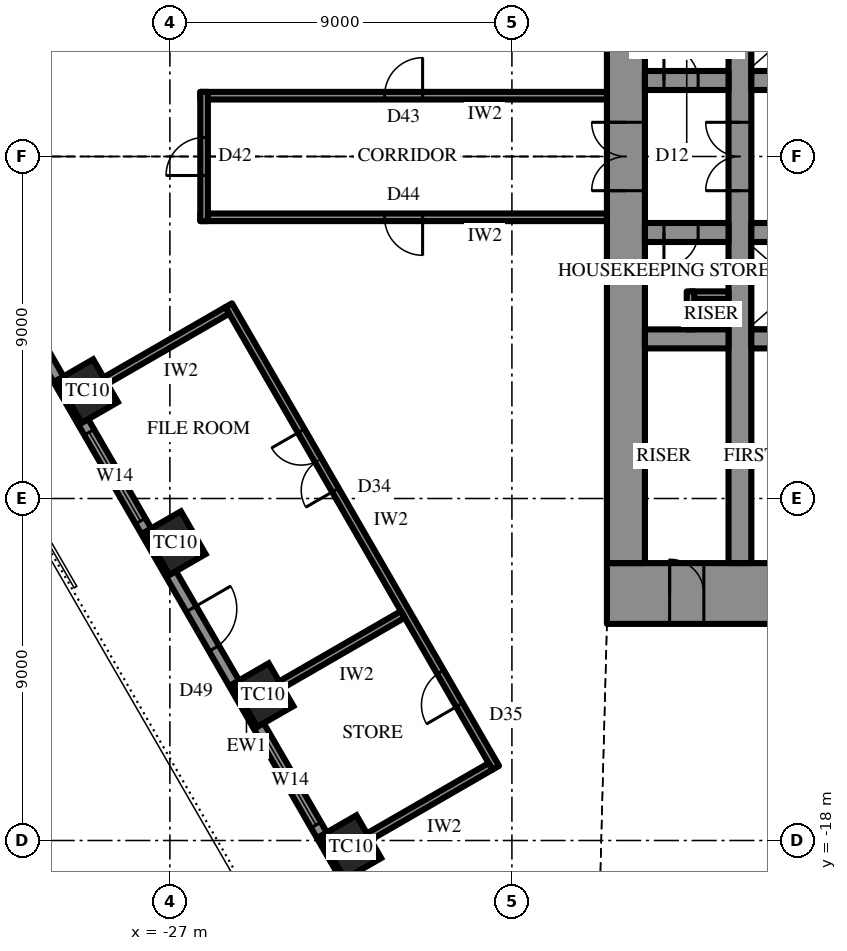
"""IFC4 building model, lengths in metres.
Left out: names, types, materials, properties, quantities, classifications, styles, units other than length and angle.
Written with IfcOpenShell. Run it as: python <this file> out.ifc"""

import sys

from ifc_helpers import new_model, si_unit, direction, frame, frame_2d, origin, origin_2d, place, context, subcontext, project, spatial, rectangle, extrude, element, fill, save


model = new_model("IFC4")
c1 = context("Model", 3, precision=1e-05, world=origin(), true_north=direction((0.0, 1.0)))
c2 = subcontext(c1, "Body", "Model", "MODEL_VIEW")
j1 = project(units=[si_unit("LENGTHUNIT", "METRE"), si_unit("PLANEANGLEUNIT", "RADIAN")], contexts=[c1])
p1 = place(None, origin())
s1 = spatial("IfcSite", under=j1, at=p1, CompositionType="ELEMENT")
p2 = place(p1, origin())
s2 = spatial("IfcBuilding", under=s1, at=p2, CompositionType="ELEMENT")
p3 = place(p2, frame((0.0, 0.0, 253.3)))
s3 = spatial("IfcBuildingStorey", under=s2, at=p3, CompositionType="ELEMENT", Elevation=253.3)
for number, where, z_axis, x_axis in (
    (1, (-29.171, -6.175, 0.0), (0.0, 0.0, 1.0), (0.5, -0.866, 0.0)),
    (2, (-26.861, -10.175, 0.0), (0.0, 0.0, 1.0), (0.5, -0.866, 0.0)),
    (3, (-24.552, -14.175, 0.0), (0.0, 0.0, 1.0), (0.5, -0.866, 0.0)),
    (4, (-22.242, -18.175, 0.0), (0.0, 0.0, 1.0), (0.5, -0.866, 0.0)),
):
    element("IfcColumn", number, at=place(p3, frame(where, z_axis=z_axis, x_axis=x_axis)), inside=s3, PredefinedType="COLUMN", context=c2, shape_type="SweptSolid", body=[
        extrude(rectangle(XDim=1.3, YDim=1.1, at=origin_2d()), origin(), (0.0, 0.0, 1.0), 4.2),
    ])
p4 = place(p3, frame((15.5, -11.5, 0.0), z_axis=(0.0, 0.0, 1.0), x_axis=(-1.0, 0.0, 0.0)))
e5 = element("IfcWall", 5, at=p4, inside=s3, PredefinedType="SHEAR", context=c2, shape_type="SweptSolid", body=[
    extrude(rectangle(XDim=31.0, YDim=1.6, at=frame_2d((15.5, 0.0))), origin(), (0.0, 0.0, 1.0), 4.2),
])
p5 = place(p4, frame((16.35, 0.0, 0.0)))
e6 = element("IfcOpeningElement", 6, at=p5, cuts=e5, PredefinedType="OPENING", context=c2, shape_type="SweptSolid", body=[
    extrude(rectangle(XDim=0.9, YDim=2.2, at=frame_2d((0.45, 1.1))), frame((0.0, 0.81, 0.0), z_axis=(0.0, -1.0, 0.0), x_axis=(1.0, 0.0, 0.0)), (0.0, 0.0, 1.0), 1.62),
])
p6 = place(p4, frame((19.35, 0.0, 0.0)))
e7 = element("IfcOpeningElement", 7, at=p6, cuts=e5, PredefinedType="OPENING", context=c2, shape_type="SweptSolid", body=[
    extrude(rectangle(XDim=0.9, YDim=2.2, at=frame_2d((0.45, 1.1))), frame((0.0, 0.81, 0.0), z_axis=(0.0, -1.0, 0.0), x_axis=(1.0, 0.0, 0.0)), (0.0, 0.0, 1.0), 1.62),
])
p7 = place(p4, frame((22.4, 0.0, 0.0)))
e8 = element("IfcOpeningElement", 8, at=p7, cuts=e5, PredefinedType="OPENING", context=c2, shape_type="SweptSolid", body=[
    extrude(rectangle(XDim=1.0, YDim=2.2, at=frame_2d((0.5, 1.1))), frame((0.0, 0.81, 0.0), z_axis=(0.0, -1.0, 0.0), x_axis=(1.0, 0.0, 0.0)), (0.0, 0.0, 1.0), 1.62),
])
p8 = place(p4, frame((1.65, 0.0, 0.0)))
e9 = element("IfcOpeningElement", 9, at=p8, cuts=e5, PredefinedType="OPENING", context=c2, shape_type="SweptSolid", body=[
    extrude(rectangle(XDim=0.9, YDim=2.2, at=frame_2d((0.45, 1.1))), frame((0.0, 0.81, 0.0), z_axis=(0.0, -1.0, 0.0), x_axis=(1.0, 0.0, 0.0)), (0.0, 0.0, 1.0), 1.62),
])
p9 = place(p4, frame((4.65, 0.0, 0.0)))
e10 = element("IfcOpeningElement", 10, at=p9, cuts=e5, PredefinedType="OPENING", context=c2, shape_type="SweptSolid", body=[
    extrude(rectangle(XDim=0.9, YDim=2.2, at=frame_2d((0.45, 1.1))), frame((0.0, 0.81, 0.0), z_axis=(0.0, -1.0, 0.0), x_axis=(1.0, 0.0, 0.0)), (0.0, 0.0, 1.0), 1.62),
])
p10 = place(p4, frame((25.45, 0.0, 0.0)))
e11 = element("IfcOpeningElement", 11, at=p10, cuts=e5, PredefinedType="OPENING", context=c2, shape_type="SweptSolid", body=[
    extrude(rectangle(XDim=0.9, YDim=2.2, at=frame_2d((0.45, 1.1))), frame((0.0, 0.81, 0.0), z_axis=(0.0, -1.0, 0.0), x_axis=(1.0, 0.0, 0.0)), (0.0, 0.0, 1.0), 1.62),
])
p11 = place(p4, frame((28.45, 0.0, 0.0)))
e12 = element("IfcOpeningElement", 12, at=p11, cuts=e5, PredefinedType="OPENING", context=c2, shape_type="SweptSolid", body=[
    extrude(rectangle(XDim=0.9, YDim=2.2, at=frame_2d((0.45, 1.1))), frame((0.0, 0.81, 0.0), z_axis=(0.0, -1.0, 0.0), x_axis=(1.0, 0.0, 0.0)), (0.0, 0.0, 1.0), 1.62),
])
p12 = place(p3, frame((-15.0, 10.7, 0.0), z_axis=(0.0, 0.0, 1.0), x_axis=(0.0, -1.0, 0.0)))
e13 = element("IfcWall", 13, at=p12, inside=s3, PredefinedType="SHEAR", context=c2, shape_type="SweptSolid", body=[
    extrude(rectangle(XDim=21.4, YDim=1.0, at=frame_2d((10.7, 0.0))), origin(), (0.0, 0.0, 1.0), 4.2),
])
p13 = place(p12, frame((9.8, 0.0, 0.0)))
e14 = element("IfcOpeningElement", 14, at=p13, cuts=e13, PredefinedType="OPENING", context=c2, shape_type="SweptSolid", body=[
    extrude(rectangle(XDim=1.8, YDim=2.4, at=frame_2d((0.9, 1.2))), frame((0.0, 0.51, 0.0), z_axis=(0.0, -1.0, 0.0), x_axis=(1.0, 0.0, 0.0)), (0.0, 0.0, 1.0), 1.02),
])
p14 = place(p3, frame((-12.0, -10.7, 0.0), z_axis=(0.0, 0.0, 1.0), x_axis=(0.0, 1.0, 0.0)))
e15 = element("IfcWall", 15, at=p14, inside=s3, PredefinedType="SHEAR", context=c2, shape_type="SweptSolid", body=[
    extrude(rectangle(XDim=21.4, YDim=0.6, at=frame_2d((10.7, 0.0))), origin(), (0.0, 0.0, 1.0), 4.2),
])
p15 = place(p14, frame((9.8, 0.0, 0.0)))
e16 = element("IfcOpeningElement", 16, at=p15, cuts=e15, PredefinedType="OPENING", context=c2, shape_type="SweptSolid", body=[
    extrude(rectangle(XDim=1.8, YDim=2.4, at=frame_2d((0.9, 1.2))), frame((0.0, 0.31, 0.0), z_axis=(0.0, -1.0, 0.0), x_axis=(1.0, 0.0, 0.0)), (0.0, 0.0, 1.0), 0.62),
])
p16 = place(p3, frame((-14.5, 2.0, 0.0), z_axis=(0.0, 0.0, 1.0), x_axis=(1.0, 0.0, 0.0)))
e17 = element("IfcWall", 17, at=p16, inside=s3, PredefinedType="SHEAR", context=c2, shape_type="SweptSolid", body=[
    extrude(rectangle(XDim=2.2, YDim=0.5, at=frame_2d((1.1, 0.0))), origin(), (0.0, 0.0, 1.0), 4.2),
])
p17 = place(p16, frame((0.5, 0.0, 0.0)))
e18 = element("IfcOpeningElement", 18, at=p17, cuts=e17, PredefinedType="OPENING", context=c2, shape_type="SweptSolid", body=[
    extrude(rectangle(XDim=0.9, YDim=2.2, at=frame_2d((0.45, 1.1))), frame((0.0, 0.26, 0.0), z_axis=(0.0, -1.0, 0.0), x_axis=(1.0, 0.0, 0.0)), (0.0, 0.0, 1.0), 0.52),
])
p18 = place(p3, frame((-11.7, 2.0, 0.0), z_axis=(0.0, 0.0, 1.0), x_axis=(1.0, 0.0, 0.0)))
e19 = element("IfcWall", 19, at=p18, inside=s3, PredefinedType="SHEAR", context=c2, shape_type="SweptSolid", body=[
    extrude(rectangle(XDim=5.9, YDim=0.5, at=frame_2d((2.95, 0.0))), origin(), (0.0, 0.0, 1.0), 4.2),
])
p19 = place(p3, frame((3.2, -2.0, 0.0), z_axis=(0.0, 0.0, 1.0), x_axis=(-1.0, 0.0, 0.0)))
e20 = element("IfcWall", 20, at=p19, inside=s3, PredefinedType="SHEAR", context=c2, shape_type="SweptSolid", body=[
    extrude(rectangle(XDim=14.9, YDim=0.5, at=frame_2d((7.45, 0.0))), origin(), (0.0, 0.0, 1.0), 4.2),
])
p20 = place(p19, frame((1.15, 0.0, 0.0)))
e21 = element("IfcOpeningElement", 21, at=p20, cuts=e20, PredefinedType="OPENING", context=c2, shape_type="SweptSolid", body=[
    extrude(rectangle(XDim=1.1, YDim=2.2, at=frame_2d((0.55, 1.1))), frame((0.0, 0.26, 0.0), z_axis=(0.0, -1.0, 0.0), x_axis=(1.0, 0.0, 0.0)), (0.0, 0.0, 1.0), 0.52),
])
p21 = place(p19, frame((4.15, 0.0, 0.0)))
e22 = element("IfcOpeningElement", 22, at=p21, cuts=e20, PredefinedType="OPENING", context=c2, shape_type="SweptSolid", body=[
    extrude(rectangle(XDim=1.1, YDim=2.2, at=frame_2d((0.55, 1.1))), frame((0.0, 0.26, 0.0), z_axis=(0.0, -1.0, 0.0), x_axis=(1.0, 0.0, 0.0)), (0.0, 0.0, 1.0), 0.52),
])
p22 = place(p19, frame((7.15, 0.0, 0.0)))
e23 = element("IfcOpeningElement", 23, at=p22, cuts=e20, PredefinedType="OPENING", context=c2, shape_type="SweptSolid", body=[
    extrude(rectangle(XDim=1.1, YDim=2.2, at=frame_2d((0.55, 1.1))), frame((0.0, 0.26, 0.0), z_axis=(0.0, -1.0, 0.0), x_axis=(1.0, 0.0, 0.0)), (0.0, 0.0, 1.0), 0.52),
])
p23 = place(p19, frame((10.15, 0.0, 0.0)))
e24 = element("IfcOpeningElement", 24, at=p23, cuts=e20, PredefinedType="OPENING", context=c2, shape_type="SweptSolid", body=[
    extrude(rectangle(XDim=1.1, YDim=2.2, at=frame_2d((0.55, 1.1))), frame((0.0, 0.26, 0.0), z_axis=(0.0, -1.0, 0.0), x_axis=(1.0, 0.0, 0.0)), (0.0, 0.0, 1.0), 0.52),
])
p24 = place(p3, frame((-12.3, -2.0, 0.0), z_axis=(0.0, 0.0, 1.0), x_axis=(-1.0, 0.0, 0.0)))
e25 = element("IfcWall", 25, at=p24, inside=s3, PredefinedType="SHEAR", context=c2, shape_type="SweptSolid", body=[
    extrude(rectangle(XDim=2.2, YDim=0.5, at=frame_2d((1.1, 0.0))), origin(), (0.0, 0.0, 1.0), 4.2),
])
p25 = place(p24, frame((0.8, 0.0, 0.0)))
e26 = element("IfcOpeningElement", 26, at=p25, cuts=e25, PredefinedType="OPENING", context=c2, shape_type="SweptSolid", body=[
    extrude(rectangle(XDim=0.9, YDim=2.2, at=frame_2d((0.45, 1.1))), frame((0.0, 0.26, 0.0), z_axis=(0.0, -1.0, 0.0), x_axis=(1.0, 0.0, 0.0)), (0.0, 0.0, 1.0), 0.52),
])
p26 = place(p3, frame((11.7, -4.8, 0.0), z_axis=(0.0, 0.0, 1.0), x_axis=(-1.0, 0.0, 0.0)))
e27 = element("IfcWall", 27, at=p26, inside=s3, PredefinedType="SHEAR", context=c2, shape_type="SweptSolid", body=[
    extrude(rectangle(XDim=23.4, YDim=0.5, at=frame_2d((11.7, 0.0))), origin(), (0.0, 0.0, 1.0), 4.2),
])
p27 = place(p26, frame((6.6, 0.0, 0.0)))
e28 = element("IfcOpeningElement", 28, at=p27, cuts=e27, PredefinedType="OPENING", context=c2, shape_type="SweptSolid", body=[
    extrude(rectangle(XDim=1.2, YDim=2.2, at=frame_2d((0.6, 1.1))), frame((0.0, 0.26, 0.0), z_axis=(0.0, -1.0, 0.0), x_axis=(1.0, 0.0, 0.0)), (0.0, 0.0, 1.0), 0.52),
])
p28 = place(p26, frame((3.6, 0.0, 0.0)))
e29 = element("IfcOpeningElement", 29, at=p28, cuts=e27, PredefinedType="OPENING", context=c2, shape_type="SweptSolid", body=[
    extrude(rectangle(XDim=1.2, YDim=2.2, at=frame_2d((0.6, 1.1))), frame((0.0, 0.26, 0.0), z_axis=(0.0, -1.0, 0.0), x_axis=(1.0, 0.0, 0.0)), (0.0, 0.0, 1.0), 0.52),
])
p29 = place(p3, frame((-12.3, -4.8, 0.0), z_axis=(0.0, 0.0, 1.0), x_axis=(-1.0, 0.0, 0.0)))
e30 = element("IfcWall", 30, at=p29, inside=s3, PredefinedType="SHEAR", context=c2, shape_type="SweptSolid", body=[
    extrude(rectangle(XDim=2.2, YDim=0.5, at=frame_2d((1.1, 0.0))), origin(), (0.0, 0.0, 1.0), 4.2),
])
p30 = place(p3, frame((-31.263, -3.551, 0.0), z_axis=(0.0, 0.0, 1.0), x_axis=(0.500000442367, -0.866025148383, 0.0)))
e31 = element("IfcWall", 31, at=p30, inside=s3, PredefinedType="SOLIDWALL", context=c2, shape_type="SweptSolid", body=[
    extrude(rectangle(XDim=25.113, YDim=0.3, at=frame_2d((12.556, 0.0))), origin(), (0.0, 0.0, 1.0), 2.8),
])
p31 = place(p30, frame((4.278, 0.0, 0.6)))
e32 = element("IfcOpeningElement", 32, at=p31, cuts=e31, PredefinedType="OPENING", context=c2, shape_type="SweptSolid", body=[
    extrude(rectangle(XDim=2.7, YDim=1.95, at=frame_2d((1.35, 0.975))), frame((0.0, 0.16, 0.0), z_axis=(0.0, -1.0, 0.0), x_axis=(1.0, 0.0, 0.0)), (0.0, 0.0, 1.0), 0.32),
])
p32 = place(p30, frame((9.647, 0.0, 0.0)))
e33 = element("IfcOpeningElement", 33, at=p32, cuts=e31, PredefinedType="OPENING", context=c2, shape_type="SweptSolid", body=[
    extrude(rectangle(XDim=1.2, YDim=2.4, at=frame_2d((0.6, 1.2))), frame((0.0, 0.16, 0.0), z_axis=(0.0, -1.0, 0.0), x_axis=(1.0, 0.0, 0.0)), (0.0, 0.0, 1.0), 0.32),
])
p33 = place(p30, frame((13.516, 0.0, 0.6)))
e34 = element("IfcOpeningElement", 34, at=p33, cuts=e31, PredefinedType="OPENING", context=c2, shape_type="SweptSolid", body=[
    extrude(rectangle(XDim=2.7, YDim=1.95, at=frame_2d((1.35, 0.975))), frame((0.0, 0.16, 0.0), z_axis=(0.0, -1.0, 0.0), x_axis=(1.0, 0.0, 0.0)), (0.0, 0.0, 1.0), 0.32),
])
p34 = place(p30, frame((18.135, 0.0, 0.6)))
e35 = element("IfcOpeningElement", 35, at=p34, cuts=e31, PredefinedType="OPENING", context=c2, shape_type="SweptSolid", body=[
    extrude(rectangle(XDim=2.7, YDim=1.95, at=frame_2d((1.35, 0.975))), frame((0.0, 0.16, 0.0), z_axis=(0.0, -1.0, 0.0), x_axis=(1.0, 0.0, 0.0)), (0.0, 0.0, 1.0), 0.32),
])
for number, where, z_axis, x_axis in (
    (36, (-12.3, -3.65, 0.0), (0.0, 0.0, 1.0), (-1.0, 0.0, 0.0)),
    (37, (-13.3, -3.55, 0.0), (0.0, 0.0, 1.0), (0.0, -1.0, 0.0)),
):
    element("IfcWall", number, at=place(p3, frame(where, z_axis=z_axis, x_axis=x_axis)), inside=s3, PredefinedType="PARTITIONING", context=c2, shape_type="SweptSolid", body=[
        extrude(rectangle(XDim=1.0, YDim=0.2, at=frame_2d((0.5, 0.0))), origin(), (0.0, 0.0, 1.0), 4.0),
    ])
p35 = place(p3, frame((-25.453, -3.913, 0.0), z_axis=(0.0, 0.0, 1.0), x_axis=(0.499989069193, -0.866031714597, 0.0)))
e38 = element("IfcWall", 38, at=p35, inside=s3, PredefinedType="PARTITIONING", context=c2, shape_type="SweptSolid", body=[
    extrude(rectangle(XDim=14.056, YDim=0.2, at=frame_2d((7.028, 0.0))), origin(), (0.0, 0.0, 1.0), 4.0),
])
p36 = place(p35, frame((3.819, 0.0, 0.0)))
e39 = element("IfcOpeningElement", 39, at=p36, cuts=e38, PredefinedType="OPENING", context=c2, shape_type="SweptSolid", body=[
    extrude(rectangle(XDim=1.8, YDim=2.4, at=frame_2d((0.9, 1.2))), frame((0.0, 0.11, 0.0), z_axis=(0.0, -1.0, 0.0), x_axis=(1.0, 0.0, 0.0)), (0.0, 0.0, 1.0), 0.22),
])
p37 = place(p35, frame((11.147, 0.0, 0.0)))
e40 = element("IfcOpeningElement", 40, at=p37, cuts=e38, PredefinedType="OPENING", context=c2, shape_type="SweptSolid", body=[
    extrude(rectangle(XDim=1.0, YDim=2.2, at=frame_2d((0.5, 1.1))), frame((0.0, 0.11, 0.0), z_axis=(0.0, -1.0, 0.0), x_axis=(1.0, 0.0, 0.0)), (0.0, 0.0, 1.0), 0.22),
])
for number, where, z_axis, x_axis in (
    (41, (-25.49, -4.05, 0.0), (0.0, 0.0, 1.0), (-0.866, -0.5, 0.0)),
    (42, (-20.871, -12.05, 0.0), (0.0, 0.0, 1.0), (-0.866, -0.5, 0.0)),
    (43, (-18.562, -16.05, 0.0), (0.0, 0.0, 1.0), (-0.866, -0.5, 0.0)),
):
    element("IfcWall", number, at=place(p3, frame(where, z_axis=z_axis, x_axis=x_axis)), inside=s3, PredefinedType="PARTITIONING", context=c2, shape_type="SweptSolid", body=[
        extrude(rectangle(XDim=3.7, YDim=0.2, at=frame_2d((1.85, 0.0))), origin(), (0.0, 0.0, 1.0), 3.082),
    ])
p38 = place(p3, frame((-15.5, 1.6, 0.0), z_axis=(0.0, 0.0, 1.0), x_axis=(-1.0, 0.0, 0.0)))
e44 = element("IfcWall", 44, at=p38, inside=s3, PredefinedType="PARTITIONING", context=c2, shape_type="SweptSolid", body=[
    extrude(rectangle(XDim=10.7, YDim=0.2, at=frame_2d((5.35, 0.0))), origin(), (0.0, 0.0, 1.0), 4.0),
])
p39 = place(p38, frame((4.85, 0.0, 0.0)))
e45 = element("IfcOpeningElement", 45, at=p39, cuts=e44, PredefinedType="OPENING", context=c2, shape_type="SweptSolid", body=[
    extrude(rectangle(XDim=1.0, YDim=2.2, at=frame_2d((0.5, 1.1))), frame((0.0, 0.11, 0.0), z_axis=(0.0, -1.0, 0.0), x_axis=(1.0, 0.0, 0.0)), (0.0, 0.0, 1.0), 0.22),
])
p40 = place(p3, frame((-15.5, -1.6, 0.0), z_axis=(0.0, 0.0, 1.0), x_axis=(-1.0, 0.0, 0.0)))
e46 = element("IfcWall", 46, at=p40, inside=s3, PredefinedType="PARTITIONING", context=c2, shape_type="SweptSolid", body=[
    extrude(rectangle(XDim=10.7, YDim=0.2, at=frame_2d((5.35, 0.0))), origin(), (0.0, 0.0, 1.0), 4.0),
])
p41 = place(p40, frame((4.85, 0.0, 0.0)))
e47 = element("IfcOpeningElement", 47, at=p41, cuts=e46, PredefinedType="OPENING", context=c2, shape_type="SweptSolid", body=[
    extrude(rectangle(XDim=1.0, YDim=2.2, at=frame_2d((0.5, 1.1))), frame((0.0, 0.11, 0.0), z_axis=(0.0, -1.0, 0.0), x_axis=(1.0, 0.0, 0.0)), (0.0, 0.0, 1.0), 0.22),
])
p42 = place(p3, frame((-26.1, -1.7, 0.0), z_axis=(0.0, 0.0, 1.0), x_axis=(0.0, 1.0, 0.0)))
e48 = element("IfcWall", 48, at=p42, inside=s3, PredefinedType="PARTITIONING", context=c2, shape_type="SweptSolid", body=[
    extrude(rectangle(XDim=3.4, YDim=0.2, at=frame_2d((1.7, 0.0))), origin(), (0.0, 0.0, 1.0), 4.0),
])
p43 = place(p42, frame((1.2, 0.0, 0.0)))
e49 = element("IfcOpeningElement", 49, at=p43, cuts=e48, PredefinedType="OPENING", context=c2, shape_type="SweptSolid", body=[
    extrude(rectangle(XDim=1.0, YDim=2.2, at=frame_2d((0.5, 1.1))), frame((0.0, 0.11, 0.0), z_axis=(0.0, -1.0, 0.0), x_axis=(1.0, 0.0, 0.0)), (0.0, 0.0, 1.0), 0.22),
])
p44 = place(p31, origin())
e50 = element("IfcWindow", 50, at=p44, inside=s3, PartitioningType="SINGLE_PANEL", PredefinedType="WINDOW", context=c2, shape_type="SweptSolid", body=[
    extrude(rectangle(XDim=2.7, YDim=1.95, at=frame_2d((1.35, 0.975))), frame((0.0, 0.03, 0.0), z_axis=(0.0, -1.0, 0.0), x_axis=(1.0, 0.0, 0.0)), (0.0, 0.0, 1.0), 0.06),
])
fill(e32, e50)
p45 = place(p32, origin())
e51 = element("IfcDoor", 51, at=p45, inside=s3, OperationType="SINGLE_SWING_RIGHT", PredefinedType="DOOR", context=c2, shape_type="SweptSolid", body=[
    extrude(rectangle(XDim=1.2, YDim=2.4, at=frame_2d((0.6, 1.2))), frame((0.0, 0.025, 0.0), z_axis=(0.0, -1.0, 0.0), x_axis=(1.0, 0.0, 0.0)), (0.0, 0.0, 1.0), 0.05),
])
fill(e33, e51)
p46 = place(p33, origin())
e52 = element("IfcWindow", 52, at=p46, inside=s3, PartitioningType="SINGLE_PANEL", PredefinedType="WINDOW", context=c2, shape_type="SweptSolid", body=[
    extrude(rectangle(XDim=2.7, YDim=1.95, at=frame_2d((1.35, 0.975))), frame((0.0, 0.03, 0.0), z_axis=(0.0, -1.0, 0.0), x_axis=(1.0, 0.0, 0.0)), (0.0, 0.0, 1.0), 0.06),
])
fill(e34, e52)
p47 = place(p13, frame((1.8, 0.0, 0.0), z_axis=(0.0, 0.0, 1.0), x_axis=(-1.0, 0.0, 0.0)))
e53 = element("IfcDoor", 53, at=p47, inside=s3, OperationType="DOUBLE_DOOR_SINGLE_SWING", PredefinedType="DOOR", context=c2, shape_type="SweptSolid", body=[
    extrude(rectangle(XDim=1.8, YDim=2.4, at=frame_2d((0.9, 1.2))), frame((0.0, 0.025, 0.0), z_axis=(0.0, -1.0, 0.0), x_axis=(1.0, 0.0, 0.0)), (0.0, 0.0, 1.0), 0.05),
])
fill(e14, e53)
p48 = place(p11, frame((0.9, 0.0, 0.0), z_axis=(0.0, 0.0, 1.0), x_axis=(-1.0, 0.0, 0.0)))
e54 = element("IfcDoor", 54, at=p48, inside=s3, OperationType="SINGLE_SWING_RIGHT", PredefinedType="DOOR", context=c2, shape_type="SweptSolid", body=[
    extrude(rectangle(XDim=0.9, YDim=2.2, at=frame_2d((0.45, 1.1))), frame((0.0, 0.025, 0.0), z_axis=(0.0, -1.0, 0.0), x_axis=(1.0, 0.0, 0.0)), (0.0, 0.0, 1.0), 0.05),
])
fill(e12, e54)
p49 = place(p17, origin())
e55 = element("IfcDoor", 55, at=p49, inside=s3, OperationType="SINGLE_SWING_RIGHT", PredefinedType="DOOR", context=c2, shape_type="SweptSolid", body=[
    extrude(rectangle(XDim=0.9, YDim=2.2, at=frame_2d((0.45, 1.1))), frame((0.0, 0.025, 0.0), z_axis=(0.0, -1.0, 0.0), x_axis=(1.0, 0.0, 0.0)), (0.0, 0.0, 1.0), 0.05),
])
fill(e18, e55)
p50 = place(p25, origin())
e56 = element("IfcDoor", 56, at=p50, inside=s3, OperationType="SINGLE_SWING_LEFT", PredefinedType="DOOR", context=c2, shape_type="SweptSolid", body=[
    extrude(rectangle(XDim=0.9, YDim=2.2, at=frame_2d((0.45, 1.1))), frame((0.0, 0.025, 0.0), z_axis=(0.0, -1.0, 0.0), x_axis=(1.0, 0.0, 0.0)), (0.0, 0.0, 1.0), 0.05),
])
fill(e26, e56)
p51 = place(p15, origin())
e57 = element("IfcDoor", 57, at=p51, inside=s3, OperationType="DOUBLE_DOOR_SINGLE_SWING", PredefinedType="DOOR", context=c2, shape_type="SweptSolid", body=[
    extrude(rectangle(XDim=1.8, YDim=2.4, at=frame_2d((0.9, 1.2))), frame((0.0, 0.025, 0.0), z_axis=(0.0, -1.0, 0.0), x_axis=(1.0, 0.0, 0.0)), (0.0, 0.0, 1.0), 0.05),
])
fill(e16, e57)
p52 = place(p36, frame((1.8, 0.0, 0.0), z_axis=(0.0, 0.0, 1.0), x_axis=(-1.0, 0.0, 0.0)))
e58 = element("IfcDoor", 58, at=p52, inside=s3, OperationType="DOUBLE_DOOR_SINGLE_SWING", PredefinedType="DOOR", context=c2, shape_type="SweptSolid", body=[
    extrude(rectangle(XDim=1.8, YDim=2.4, at=frame_2d((0.9, 1.2))), frame((0.0, 0.025, 0.0), z_axis=(0.0, -1.0, 0.0), x_axis=(1.0, 0.0, 0.0)), (0.0, 0.0, 1.0), 0.05),
])
fill(e39, e58)
p53 = place(p37, frame((1.0, 0.0, 0.0), z_axis=(0.0, 0.0, 1.0), x_axis=(-1.0, 0.0, 0.0)))
e59 = element("IfcDoor", 59, at=p53, inside=s3, OperationType="SINGLE_SWING_RIGHT", PredefinedType="DOOR", context=c2, shape_type="SweptSolid", body=[
    extrude(rectangle(XDim=1.0, YDim=2.2, at=frame_2d((0.5, 1.1))), frame((0.0, 0.025, 0.0), z_axis=(0.0, -1.0, 0.0), x_axis=(1.0, 0.0, 0.0)), (0.0, 0.0, 1.0), 0.05),
])
fill(e40, e59)
p54 = place(p39, frame((1.0, 0.0, 0.0), z_axis=(0.0, 0.0, 1.0), x_axis=(-1.0, 0.0, 0.0)))
e60 = element("IfcDoor", 60, at=p54, inside=s3, OperationType="SINGLE_SWING_LEFT", PredefinedType="DOOR", context=c2, shape_type="SweptSolid", body=[
    extrude(rectangle(XDim=1.0, YDim=2.2, at=frame_2d((0.5, 1.1))), frame((0.0, 0.025, 0.0), z_axis=(0.0, -1.0, 0.0), x_axis=(1.0, 0.0, 0.0)), (0.0, 0.0, 1.0), 0.05),
])
fill(e45, e60)
p55 = place(p41, origin())
e61 = element("IfcDoor", 61, at=p55, inside=s3, OperationType="SINGLE_SWING_RIGHT", PredefinedType="DOOR", context=c2, shape_type="SweptSolid", body=[
    extrude(rectangle(XDim=1.0, YDim=2.2, at=frame_2d((0.5, 1.1))), frame((0.0, 0.025, 0.0), z_axis=(0.0, -1.0, 0.0), x_axis=(1.0, 0.0, 0.0)), (0.0, 0.0, 1.0), 0.05),
])
fill(e47, e61)
p56 = place(p43, origin())
e62 = element("IfcDoor", 62, at=p56, inside=s3, OperationType="SINGLE_SWING_RIGHT", PredefinedType="DOOR", context=c2, shape_type="SweptSolid", body=[
    extrude(rectangle(XDim=1.0, YDim=2.2, at=frame_2d((0.5, 1.1))), frame((0.0, 0.025, 0.0), z_axis=(0.0, -1.0, 0.0), x_axis=(1.0, 0.0, 0.0)), (0.0, 0.0, 1.0), 0.05),
])
fill(e49, e62)
save(model, sys.argv[1])
